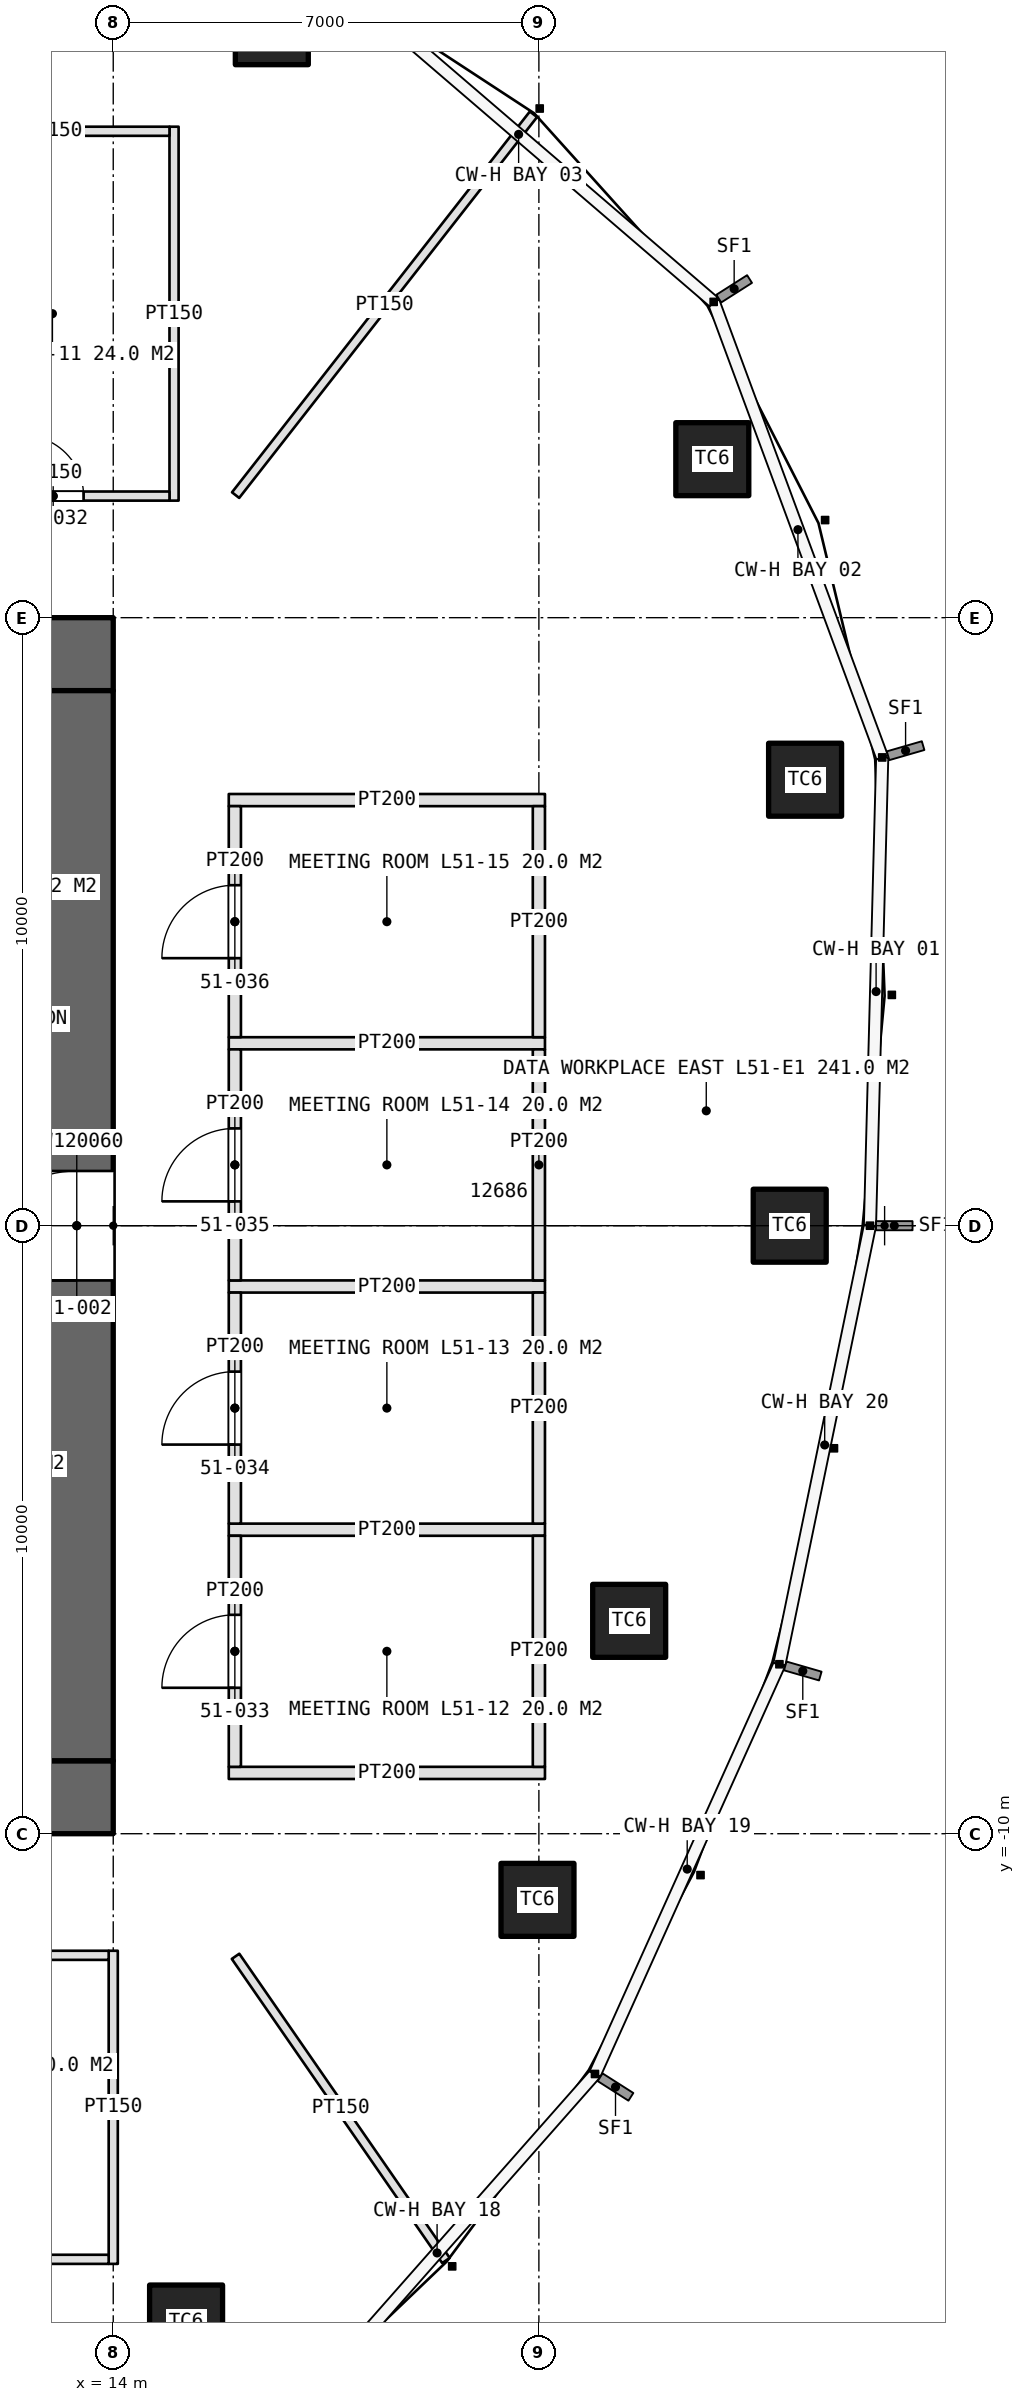
"""IFC4 building model, lengths in metres.
Left out: names, types, materials, properties, quantities, classifications, styles, units other than length and angle.
Written with IfcOpenShell. Run it as: python <this file> out.ifc"""

import sys

from ifc_helpers import new_model, si_unit, direction, frame, frame_2d, origin, origin_2d, place, context, subcontext, project, spatial, rectangle, extrude, element, fill, save


model = new_model("IFC4")
c1 = context("Model", 3, precision=1e-05, world=origin(), true_north=direction((0.0, 1.0)))
c2 = subcontext(c1, "Body", "Model", "MODEL_VIEW")
j1 = project(units=[si_unit("LENGTHUNIT", "METRE"), si_unit("PLANEANGLEUNIT", "RADIAN")], contexts=[c1])
p1 = place(None, origin())
s1 = spatial("IfcSite", under=j1, at=p1, CompositionType="ELEMENT")
p2 = place(p1, origin())
s2 = spatial("IfcBuilding", under=s1, at=p2, CompositionType="ELEMENT")
p3 = place(p2, frame((0.0, 0.0, 232.6)))
s3 = spatial("IfcBuildingStorey", under=s2, at=p3, CompositionType="ELEMENT", Elevation=232.6)
p4 = place(p3, frame((-14.0, -9.4, 0.0), z_axis=(0.0, 0.0, 1.0), x_axis=(1.0, 0.0, 0.0)))
e1 = element("IfcWall", 1, at=p4, inside=s3, PredefinedType="SHEAR", context=c2, shape_type="SweptSolid", body=[
    extrude(rectangle(XDim=28.0, YDim=1.2, at=frame_2d((14.0, 0.0))), origin(), (0.0, 0.0, 1.0), 4.2),
])
p5 = place(p4, frame((22.9, 0.0, 0.0)))
e2 = element("IfcOpeningElement", 2, at=p5, cuts=e1, PredefinedType="OPENING", context=c2, shape_type="SweptSolid", body=[
    extrude(rectangle(XDim=2.2, YDim=2.7, at=frame_2d((1.1, 1.35))), frame((0.0, 0.61, 0.0), z_axis=(0.0, -1.0, 0.0), x_axis=(1.0, 0.0, 0.0)), (0.0, 0.0, 1.0), 1.22),
])
p6 = place(p3, frame((14.0, 9.4, 0.0), z_axis=(0.0, 0.0, 1.0), x_axis=(-1.0, 0.0, 0.0)))
e3 = element("IfcWall", 3, at=p6, inside=s3, PredefinedType="SHEAR", context=c2, shape_type="SweptSolid", body=[
    extrude(rectangle(XDim=28.0, YDim=1.2, at=frame_2d((14.0, 0.0))), origin(), (0.0, 0.0, 1.0), 4.2),
])
p7 = place(p6, frame((24.0, 0.0, 0.0)))
e4 = element("IfcOpeningElement", 4, at=p7, cuts=e3, PredefinedType="OPENING", context=c2, shape_type="SweptSolid", body=[
    extrude(rectangle(XDim=1.0, YDim=2.4, at=frame_2d((0.5, 1.2))), frame((0.0, 0.61, 0.0), z_axis=(0.0, -1.0, 0.0), x_axis=(1.0, 0.0, 0.0)), (0.0, 0.0, 1.0), 1.22),
])
p8 = place(p3, frame((13.4, -8.8, 0.0), z_axis=(0.0, 0.0, 1.0), x_axis=(0.0, 1.0, 0.0)))
e5 = element("IfcWall", 5, at=p8, inside=s3, PredefinedType="SHEAR", context=c2, shape_type="SweptSolid", body=[
    extrude(rectangle(XDim=17.6, YDim=1.2, at=frame_2d((8.8, 0.0))), origin(), (0.0, 0.0, 1.0), 4.2),
])
p9 = place(p8, frame((7.9, 0.0, 0.0)))
e6 = element("IfcOpeningElement", 6, at=p9, cuts=e5, PredefinedType="OPENING", context=c2, shape_type="SweptSolid", body=[
    extrude(rectangle(XDim=1.8, YDim=2.4, at=frame_2d((0.9, 1.2))), frame((0.0, 0.61, 0.0), z_axis=(0.0, -1.0, 0.0), x_axis=(1.0, 0.0, 0.0)), (0.0, 0.0, 1.0), 1.22),
])
for number, where, z_axis, x_axis in (
    (7, (25.125, 0.0, 0.0), (0.0, 0.0, 1.0), (1.0, 0.0, 0.0)),
    (8, (25.378, 7.335, 0.0), (0.0, 0.0, 1.0), (1.0, 0.0, 0.0)),
    (9, (23.852, 12.607, 0.0), (0.0, 0.0, 1.0), (1.0, 0.0, 0.0)),
    (10, (16.608, 19.695, 0.0), (0.0, 0.0, 1.0), (1.0, 0.0, 0.0)),
    (11, (15.198, -18.023, 0.0), (0.0, 0.0, 1.0), (1.0, 0.0, 0.0)),
    (12, (20.977, -11.088, 0.0), (0.0, 0.0, 1.0), (1.0, 0.0, 0.0)),
    (13, (22.485, -6.499, 0.0), (0.0, 0.0, 1.0), (1.0, 0.0, 0.0)),
):
    element("IfcColumn", number, at=place(p3, frame(where, z_axis=z_axis, x_axis=x_axis)), inside=s3, PredefinedType="COLUMN", context=c2, shape_type="SweptSolid", body=[
        extrude(rectangle(XDim=1.2, YDim=1.2, at=origin_2d()), origin(), (0.0, 0.0, 1.0), 4.2),
    ])
p10 = place(p3, frame((14.0, -11.925, 0.0), z_axis=(0.0, 0.0, 1.0), x_axis=(0.0, -1.0, 0.0)))
e14 = element("IfcWall", 14, at=p10, inside=s3, PredefinedType="PARTITIONING", context=c2, shape_type="SweptSolid", body=[
    extrude(rectangle(XDim=5.15, YDim=0.15, at=frame_2d((2.575, 0.0))), origin(), (0.0, 0.0, 1.0), 3.0),
])
p11 = place(p3, frame((10.075, -12.0, 0.0), z_axis=(0.0, 0.0, 1.0), x_axis=(1.0, 0.0, 0.0)))
e15 = element("IfcWall", 15, at=p11, inside=s3, PredefinedType="PARTITIONING", context=c2, shape_type="SweptSolid", body=[
    extrude(rectangle(XDim=3.85, YDim=0.15, at=frame_2d((1.925, 0.0))), origin(), (0.0, 0.0, 1.0), 3.0),
])
p12 = place(p11, frame((1.375, 0.0, 0.0)))
e16 = element("IfcOpeningElement", 16, at=p12, cuts=e15, PredefinedType="OPENING", context=c2, shape_type="SweptSolid", body=[
    extrude(rectangle(XDim=1.1, YDim=2.3, at=frame_2d((0.55, 1.15))), frame((0.0, 0.085, 0.0), z_axis=(0.0, -1.0, 0.0), x_axis=(1.0, 0.0, 0.0)), (0.0, 0.0, 1.0), 0.17),
])
p13 = place(p3, frame((10.075, -17.0, 0.0), z_axis=(0.0, 0.0, 1.0), x_axis=(1.0, 0.0, 0.0)))
e17 = element("IfcWall", 17, at=p13, inside=s3, PredefinedType="PARTITIONING", context=c2, shape_type="SweptSolid", body=[
    extrude(rectangle(XDim=3.85, YDim=0.15, at=frame_2d((1.925, 0.0))), origin(), (0.0, 0.0, 1.0), 3.0),
])
p14 = place(p3, frame((15.0, 11.925, 0.0), z_axis=(0.0, 0.0, 1.0), x_axis=(0.0, 1.0, 0.0)))
e18 = element("IfcWall", 18, at=p14, inside=s3, PredefinedType="PARTITIONING", context=c2, shape_type="SweptSolid", body=[
    extrude(rectangle(XDim=6.15, YDim=0.15, at=frame_2d((3.075, 0.0))), origin(), (0.0, 0.0, 1.0), 3.0),
])
p15 = place(p3, frame((11.1, 12.0, 0.0), z_axis=(0.0, 0.0, 1.0), x_axis=(1.0, 0.0, 0.0)))
e19 = element("IfcWall", 19, at=p15, inside=s3, PredefinedType="PARTITIONING", context=c2, shape_type="SweptSolid", body=[
    extrude(rectangle(XDim=3.825, YDim=0.15, at=frame_2d((1.913, 0.0))), origin(), (0.0, 0.0, 1.0), 3.0),
])
p16 = place(p15, frame((1.413, 0.0, 0.0)))
e20 = element("IfcOpeningElement", 20, at=p16, cuts=e19, PredefinedType="OPENING", context=c2, shape_type="SweptSolid", body=[
    extrude(rectangle(XDim=1.0, YDim=2.2, at=frame_2d((0.5, 1.1))), frame((0.0, 0.085, 0.0), z_axis=(0.0, -1.0, 0.0), x_axis=(1.0, 0.0, 0.0)), (0.0, 0.0, 1.0), 0.17),
])
p17 = place(p3, frame((11.1, 18.0, 0.0), z_axis=(0.0, 0.0, 1.0), x_axis=(1.0, 0.0, 0.0)))
e21 = element("IfcWall", 21, at=p17, inside=s3, PredefinedType="PARTITIONING", context=c2, shape_type="SweptSolid", body=[
    extrude(rectangle(XDim=3.825, YDim=0.15, at=frame_2d((1.913, 0.0))), origin(), (0.0, 0.0, 1.0), 3.0),
])
for number, where, z_axis, x_axis in (
    (22, (15.9, -9.0, 0.0), (0.0, 0.0, 1.0), (1.0, 0.0, 0.0)),
    (23, (15.9, -5.0, 0.0), (0.0, 0.0, 1.0), (1.0, 0.0, 0.0)),
    (24, (15.9, -1.0, 0.0), (0.0, 0.0, 1.0), (1.0, 0.0, 0.0)),
    (25, (15.9, 3.0, 0.0), (0.0, 0.0, 1.0), (1.0, 0.0, 0.0)),
    (26, (15.9, 7.0, 0.0), (0.0, 0.0, 1.0), (1.0, 0.0, 0.0)),
):
    element("IfcWall", number, at=place(p3, frame(where, z_axis=z_axis, x_axis=x_axis)), inside=s3, PredefinedType="PARTITIONING", context=c2, shape_type="SweptSolid", body=[
        extrude(rectangle(XDim=5.2, YDim=0.2, at=frame_2d((2.6, 0.0))), origin(), (0.0, 0.0, 1.0), 3.0),
    ])
p18 = place(p3, frame((16.0, -8.9, 0.0), z_axis=(0.0, 0.0, 1.0), x_axis=(0.0, 1.0, 0.0)))
e27 = element("IfcWall", 27, at=p18, inside=s3, PredefinedType="PARTITIONING", context=c2, shape_type="SweptSolid", body=[
    extrude(rectangle(XDim=3.8, YDim=0.2, at=frame_2d((1.9, 0.0))), origin(), (0.0, 0.0, 1.0), 3.0),
])
p19 = place(p18, frame((1.3, 0.0, 0.0)))
e28 = element("IfcOpeningElement", 28, at=p19, cuts=e27, PredefinedType="OPENING", context=c2, shape_type="SweptSolid", body=[
    extrude(rectangle(XDim=1.2, YDim=2.4, at=frame_2d((0.6, 1.2))), frame((0.0, 0.11, 0.0), z_axis=(0.0, -1.0, 0.0), x_axis=(1.0, 0.0, 0.0)), (0.0, 0.0, 1.0), 0.22),
])
p20 = place(p3, frame((21.0, -8.9, 0.0), z_axis=(0.0, 0.0, 1.0), x_axis=(0.0, 1.0, 0.0)))
e29 = element("IfcWall", 29, at=p20, inside=s3, PredefinedType="PARTITIONING", context=c2, shape_type="SweptSolid", body=[
    extrude(rectangle(XDim=3.8, YDim=0.2, at=frame_2d((1.9, 0.0))), origin(), (0.0, 0.0, 1.0), 3.0),
])
p21 = place(p3, frame((16.0, -4.9, 0.0), z_axis=(0.0, 0.0, 1.0), x_axis=(0.0, 1.0, 0.0)))
e30 = element("IfcWall", 30, at=p21, inside=s3, PredefinedType="PARTITIONING", context=c2, shape_type="SweptSolid", body=[
    extrude(rectangle(XDim=3.8, YDim=0.2, at=frame_2d((1.9, 0.0))), origin(), (0.0, 0.0, 1.0), 3.0),
])
p22 = place(p21, frame((1.3, 0.0, 0.0)))
e31 = element("IfcOpeningElement", 31, at=p22, cuts=e30, PredefinedType="OPENING", context=c2, shape_type="SweptSolid", body=[
    extrude(rectangle(XDim=1.2, YDim=2.4, at=frame_2d((0.6, 1.2))), frame((0.0, 0.11, 0.0), z_axis=(0.0, -1.0, 0.0), x_axis=(1.0, 0.0, 0.0)), (0.0, 0.0, 1.0), 0.22),
])
p23 = place(p3, frame((21.0, -4.9, 0.0), z_axis=(0.0, 0.0, 1.0), x_axis=(0.0, 1.0, 0.0)))
e32 = element("IfcWall", 32, at=p23, inside=s3, PredefinedType="PARTITIONING", context=c2, shape_type="SweptSolid", body=[
    extrude(rectangle(XDim=3.8, YDim=0.2, at=frame_2d((1.9, 0.0))), origin(), (0.0, 0.0, 1.0), 3.0),
])
p24 = place(p3, frame((16.0, -0.9, 0.0), z_axis=(0.0, 0.0, 1.0), x_axis=(0.0, 1.0, 0.0)))
e33 = element("IfcWall", 33, at=p24, inside=s3, PredefinedType="PARTITIONING", context=c2, shape_type="SweptSolid", body=[
    extrude(rectangle(XDim=3.8, YDim=0.2, at=frame_2d((1.9, 0.0))), origin(), (0.0, 0.0, 1.0), 3.0),
])
p25 = place(p24, frame((1.3, 0.0, 0.0)))
e34 = element("IfcOpeningElement", 34, at=p25, cuts=e33, PredefinedType="OPENING", context=c2, shape_type="SweptSolid", body=[
    extrude(rectangle(XDim=1.2, YDim=2.4, at=frame_2d((0.6, 1.2))), frame((0.0, 0.11, 0.0), z_axis=(0.0, -1.0, 0.0), x_axis=(1.0, 0.0, 0.0)), (0.0, 0.0, 1.0), 0.22),
])
p26 = place(p3, frame((21.0, -0.9, 0.0), z_axis=(0.0, 0.0, 1.0), x_axis=(0.0, 1.0, 0.0)))
e35 = element("IfcWall", 35, at=p26, inside=s3, PredefinedType="PARTITIONING", context=c2, shape_type="SweptSolid", body=[
    extrude(rectangle(XDim=3.8, YDim=0.2, at=frame_2d((1.9, 0.0))), origin(), (0.0, 0.0, 1.0), 3.0),
])
p27 = place(p3, frame((16.0, 3.1, 0.0), z_axis=(0.0, 0.0, 1.0), x_axis=(0.0, 1.0, 0.0)))
e36 = element("IfcWall", 36, at=p27, inside=s3, PredefinedType="PARTITIONING", context=c2, shape_type="SweptSolid", body=[
    extrude(rectangle(XDim=3.8, YDim=0.2, at=frame_2d((1.9, 0.0))), origin(), (0.0, 0.0, 1.0), 3.0),
])
p28 = place(p27, frame((1.3, 0.0, 0.0)))
e37 = element("IfcOpeningElement", 37, at=p28, cuts=e36, PredefinedType="OPENING", context=c2, shape_type="SweptSolid", body=[
    extrude(rectangle(XDim=1.2, YDim=2.4, at=frame_2d((0.6, 1.2))), frame((0.0, 0.11, 0.0), z_axis=(0.0, -1.0, 0.0), x_axis=(1.0, 0.0, 0.0)), (0.0, 0.0, 1.0), 0.22),
])
p29 = place(p3, frame((21.0, 3.1, 0.0), z_axis=(0.0, 0.0, 1.0), x_axis=(0.0, 1.0, 0.0)))
e38 = element("IfcWall", 38, at=p29, inside=s3, PredefinedType="PARTITIONING", context=c2, shape_type="SweptSolid", body=[
    extrude(rectangle(XDim=3.8, YDim=0.2, at=frame_2d((1.9, 0.0))), origin(), (0.0, 0.0, 1.0), 3.0),
])
p30 = place(p3, frame((16.011, -12.016, 0.0), z_axis=(0.0, 0.0, 1.0), x_axis=(0.568863489071, -0.822431961199, 0.0)))
e39 = element("IfcWall", 39, at=p30, inside=s3, PredefinedType="PARTITIONING", context=c2, shape_type="SweptSolid", body=[
    extrude(rectangle(XDim=6.083, YDim=0.15, at=frame_2d((3.042, 0.0))), origin(), (0.0, 0.0, 1.0), 3.0),
])
p31 = place(p3, frame((16.012, 12.016, 0.0), z_axis=(0.0, 0.0, 1.0), x_axis=(0.616030058222, 0.787722646219, 0.0)))
e40 = element("IfcWall", 40, at=p31, inside=s3, PredefinedType="PARTITIONING", context=c2, shape_type="SweptSolid", body=[
    extrude(rectangle(XDim=7.952, YDim=0.15, at=frame_2d((3.976, 0.0))), origin(), (0.0, 0.0, 1.0), 3.0),
])
p32 = place(p9, origin())
e41 = element("IfcDoor", 41, at=p32, inside=s3, OperationType="DOUBLE_DOOR_SINGLE_SWING", PredefinedType="DOOR", context=c2, shape_type="SweptSolid", body=[
    extrude(rectangle(XDim=1.8, YDim=2.4, at=frame_2d((0.9, 1.2))), frame((0.0, 0.025, 0.0), z_axis=(0.0, -1.0, 0.0), x_axis=(1.0, 0.0, 0.0)), (0.0, 0.0, 1.0), 0.05),
])
fill(e6, e41)
p33 = place(p16, origin())
e42 = element("IfcDoor", 42, at=p33, inside=s3, OperationType="SINGLE_SWING_LEFT", PredefinedType="DOOR", context=c2, shape_type="SweptSolid", body=[
    extrude(rectangle(XDim=1.0, YDim=2.2, at=frame_2d((0.5, 1.1))), frame((0.0, 0.025, 0.0), z_axis=(0.0, -1.0, 0.0), x_axis=(1.0, 0.0, 0.0)), (0.0, 0.0, 1.0), 0.05),
])
fill(e20, e42)
p34 = place(p19, origin())
e43 = element("IfcDoor", 43, at=p34, inside=s3, OperationType="SINGLE_SWING_LEFT", PredefinedType="DOOR", context=c2, shape_type="SweptSolid", body=[
    extrude(rectangle(XDim=1.2, YDim=2.4, at=frame_2d((0.6, 1.2))), frame((0.0, 0.025, 0.0), z_axis=(0.0, -1.0, 0.0), x_axis=(1.0, 0.0, 0.0)), (0.0, 0.0, 1.0), 0.05),
])
fill(e28, e43)
p35 = place(p22, origin())
e44 = element("IfcDoor", 44, at=p35, inside=s3, OperationType="SINGLE_SWING_LEFT", PredefinedType="DOOR", context=c2, shape_type="SweptSolid", body=[
    extrude(rectangle(XDim=1.2, YDim=2.4, at=frame_2d((0.6, 1.2))), frame((0.0, 0.025, 0.0), z_axis=(0.0, -1.0, 0.0), x_axis=(1.0, 0.0, 0.0)), (0.0, 0.0, 1.0), 0.05),
])
fill(e31, e44)
p36 = place(p25, origin())
e45 = element("IfcDoor", 45, at=p36, inside=s3, OperationType="SINGLE_SWING_LEFT", PredefinedType="DOOR", context=c2, shape_type="SweptSolid", body=[
    extrude(rectangle(XDim=1.2, YDim=2.4, at=frame_2d((0.6, 1.2))), frame((0.0, 0.025, 0.0), z_axis=(0.0, -1.0, 0.0), x_axis=(1.0, 0.0, 0.0)), (0.0, 0.0, 1.0), 0.05),
])
fill(e34, e45)
p37 = place(p28, origin())
e46 = element("IfcDoor", 46, at=p37, inside=s3, OperationType="SINGLE_SWING_LEFT", PredefinedType="DOOR", context=c2, shape_type="SweptSolid", body=[
    extrude(rectangle(XDim=1.2, YDim=2.4, at=frame_2d((0.6, 1.2))), frame((0.0, 0.025, 0.0), z_axis=(0.0, -1.0, 0.0), x_axis=(1.0, 0.0, 0.0)), (0.0, 0.0, 1.0), 0.05),
])
fill(e37, e46)
save(model, sys.argv[1])
